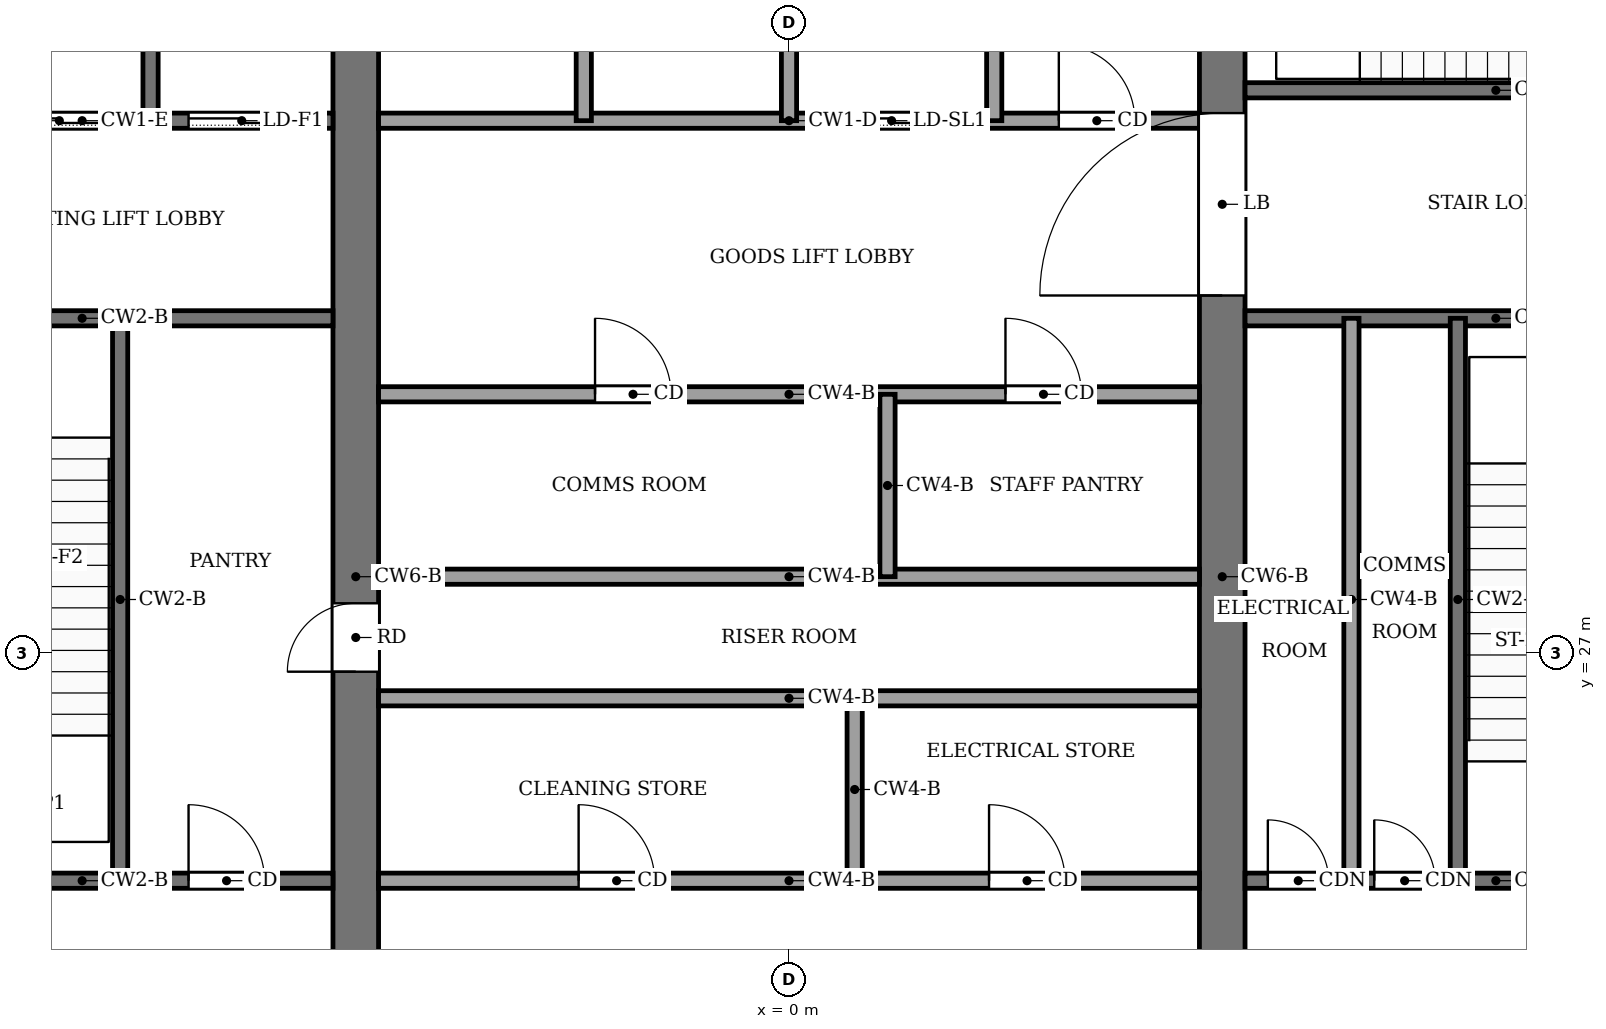
"""IFC4 building model, lengths in metres.
Left out: names, types, materials, properties, quantities, classifications, styles, units other than length and angle.
Written with IfcOpenShell. Run it as: python <this file> out.ifc"""

import sys

from ifc_helpers import new_model, si_unit, direction, frame, frame_2d, origin, place, context, subcontext, project, spatial, rectangle, extrude, element, fill, save


model = new_model("IFC4")
c1 = context("Model", 3, precision=1e-05, world=origin(), true_north=direction((0.0, 1.0)))
c2 = subcontext(c1, "Body", "Model", "MODEL_VIEW")
j1 = project(units=[si_unit("LENGTHUNIT", "METRE"), si_unit("PLANEANGLEUNIT", "RADIAN")], contexts=[c1])
p1 = place(None, origin())
s1 = spatial("IfcSite", under=j1, at=p1, CompositionType="ELEMENT")
p2 = place(p1, origin())
s2 = spatial("IfcBuilding", under=s1, at=p2, CompositionType="ELEMENT")
p3 = place(p2, frame((0.0, 0.0, 289.0)))
s3 = spatial("IfcBuildingStorey", under=s2, at=p3, CompositionType="ELEMENT", Elevation=289.0)
p4 = place(p3, frame((-5.7, 18.4, -0.13), z_axis=(0.0, 0.0, 1.0), x_axis=(0.0, 1.0, 0.0)))
e1 = element("IfcWall", 1, at=p4, inside=s3, PredefinedType="SHEAR", context=c2, shape_type="SweptSolid", body=[
    extrude(rectangle(XDim=19.2, YDim=0.6, at=frame_2d((9.6, 0.0))), origin(), (0.0, 0.0, 1.0), 5.0),
])
p5 = place(p4, frame((8.35, 0.0, 0.13)))
e2 = element("IfcOpeningElement", 2, at=p5, cuts=e1, PredefinedType="OPENING", context=c2, shape_type="SweptSolid", body=[
    extrude(rectangle(XDim=0.9, YDim=2.1, at=frame_2d((0.45, 1.05))), frame((0.0, 0.31, 0.0), z_axis=(0.0, -1.0, 0.0), x_axis=(1.0, 0.0, 0.0)), (0.0, 0.0, 1.0), 0.62),
])
p6 = place(p3, frame((5.7, 18.4, -0.13), z_axis=(0.0, 0.0, 1.0), x_axis=(0.0, 1.0, 0.0)))
e3 = element("IfcWall", 3, at=p6, inside=s3, PredefinedType="SHEAR", context=c2, shape_type="SweptSolid", body=[
    extrude(rectangle(XDim=19.2, YDim=0.6, at=frame_2d((9.6, 0.0))), origin(), (0.0, 0.0, 1.0), 5.0),
])
p7 = place(p6, frame((13.3, 0.0, 0.13)))
e4 = element("IfcOpeningElement", 4, at=p7, cuts=e3, PredefinedType="OPENING", context=c2, shape_type="SweptSolid", body=[
    extrude(rectangle(XDim=2.4, YDim=2.4, at=frame_2d((1.2, 1.2))), frame((0.0, 0.31, 0.0), z_axis=(0.0, -1.0, 0.0), x_axis=(1.0, 0.0, 0.0)), (0.0, 0.0, 1.0), 0.62),
])
p8 = place(p3, frame((-12.6, 24.0, 0.0), z_axis=(0.0, 0.0, 1.0), x_axis=(1.0, 0.0, 0.0)))
e5 = element("IfcWall", 5, at=p8, inside=s3, PredefinedType="PARTITIONING", context=c2, shape_type="SweptSolid", body=[
    extrude(rectangle(XDim=6.6, YDim=0.2, at=frame_2d((3.3, 0.0))), origin(), (0.0, 0.0, 1.0), 4.87),
])
p9 = place(p8, frame((4.7, 0.0, 0.0)))
e6 = element("IfcOpeningElement", 6, at=p9, cuts=e5, PredefinedType="OPENING", context=c2, shape_type="SweptSolid", body=[
    extrude(rectangle(XDim=1.0, YDim=2.1, at=frame_2d((0.5, 1.05))), frame((0.0, 0.11, 0.0), z_axis=(0.0, -1.0, 0.0), x_axis=(1.0, 0.0, 0.0)), (0.0, 0.0, 1.0), 0.22),
])
p10 = place(p3, frame((-5.4, 24.0, 0.0), z_axis=(0.0, 0.0, 1.0), x_axis=(1.0, 0.0, 0.0)))
e7 = element("IfcWall", 7, at=p10, inside=s3, PredefinedType="PARTITIONING", context=c2, shape_type="SweptSolid", body=[
    extrude(rectangle(XDim=10.8, YDim=0.2, at=frame_2d((5.4, 0.0))), origin(), (0.0, 0.0, 1.0), 4.87),
])
p11 = place(p10, frame((2.632, 0.0, 0.0)))
e8 = element("IfcOpeningElement", 8, at=p11, cuts=e7, PredefinedType="OPENING", context=c2, shape_type="SweptSolid", body=[
    extrude(rectangle(XDim=1.0, YDim=2.1, at=frame_2d((0.5, 1.05))), frame((0.0, 0.11, 0.0), z_axis=(0.0, -1.0, 0.0), x_axis=(1.0, 0.0, 0.0)), (0.0, 0.0, 1.0), 0.22),
])
p12 = place(p10, frame((8.032, 0.0, 0.0)))
e9 = element("IfcOpeningElement", 9, at=p12, cuts=e7, PredefinedType="OPENING", context=c2, shape_type="SweptSolid", body=[
    extrude(rectangle(XDim=1.0, YDim=2.1, at=frame_2d((0.5, 1.05))), frame((0.0, 0.11, 0.0), z_axis=(0.0, -1.0, 0.0), x_axis=(1.0, 0.0, 0.0)), (0.0, 0.0, 1.0), 0.22),
])
p13 = place(p3, frame((6.0, 24.0, 0.0), z_axis=(0.0, 0.0, 1.0), x_axis=(1.0, 0.0, 0.0)))
e10 = element("IfcWall", 10, at=p13, inside=s3, PredefinedType="PARTITIONING", context=c2, shape_type="SweptSolid", body=[
    extrude(rectangle(XDim=6.6, YDim=0.2, at=frame_2d((3.3, 0.0))), origin(), (0.0, 0.0, 1.0), 4.87),
])
p14 = place(p13, frame((0.3, 0.0, 0.0)))
e11 = element("IfcOpeningElement", 11, at=p14, cuts=e10, PredefinedType="OPENING", context=c2, shape_type="SweptSolid", body=[
    extrude(rectangle(XDim=0.8, YDim=2.1, at=frame_2d((0.4, 1.05))), frame((0.0, 0.11, 0.0), z_axis=(0.0, -1.0, 0.0), x_axis=(1.0, 0.0, 0.0)), (0.0, 0.0, 1.0), 0.22),
])
p15 = place(p13, frame((1.7, 0.0, 0.0)))
e12 = element("IfcOpeningElement", 12, at=p15, cuts=e10, PredefinedType="OPENING", context=c2, shape_type="SweptSolid", body=[
    extrude(rectangle(XDim=0.8, YDim=2.1, at=frame_2d((0.4, 1.05))), frame((0.0, 0.11, 0.0), z_axis=(0.0, -1.0, 0.0), x_axis=(1.0, 0.0, 0.0)), (0.0, 0.0, 1.0), 0.22),
])
p16 = place(p13, frame((4.4, 0.0, 0.0)))
e13 = element("IfcOpeningElement", 13, at=p16, cuts=e10, PredefinedType="OPENING", context=c2, shape_type="SweptSolid", body=[
    extrude(rectangle(XDim=1.2, YDim=2.2, at=frame_2d((0.6, 1.1))), frame((0.0, 0.11, 0.0), z_axis=(0.0, -1.0, 0.0), x_axis=(1.0, 0.0, 0.0)), (0.0, 0.0, 1.0), 0.22),
])
for number, where, z_axis, x_axis in (
    (14, (-5.4, 26.4, 0.0), (0.0, 0.0, 1.0), (1.0, 0.0, 0.0)),
    (15, (-5.4, 28.0, 0.0), (0.0, 0.0, 1.0), (1.0, 0.0, 0.0)),
):
    element("IfcWall", number, at=place(p3, frame(where, z_axis=z_axis, x_axis=x_axis)), inside=s3, PredefinedType="PARTITIONING", context=c2, shape_type="SweptSolid", body=[
        extrude(rectangle(XDim=10.8, YDim=0.2, at=frame_2d((5.4, 0.0))), origin(), (0.0, 0.0, 1.0), 4.87),
    ])
p17 = place(p3, frame((-5.4, 30.4, 0.0), z_axis=(0.0, 0.0, 1.0), x_axis=(1.0, 0.0, 0.0)))
e16 = element("IfcWall", 16, at=p17, inside=s3, PredefinedType="PARTITIONING", context=c2, shape_type="SweptSolid", body=[
    extrude(rectangle(XDim=10.8, YDim=0.2, at=frame_2d((5.4, 0.0))), origin(), (0.0, 0.0, 1.0), 4.87),
])
p18 = place(p17, frame((2.848, 0.0, 0.0)))
e17 = element("IfcOpeningElement", 17, at=p18, cuts=e16, PredefinedType="OPENING", context=c2, shape_type="SweptSolid", body=[
    extrude(rectangle(XDim=1.0, YDim=2.1, at=frame_2d((0.5, 1.05))), frame((0.0, 0.11, 0.0), z_axis=(0.0, -1.0, 0.0), x_axis=(1.0, 0.0, 0.0)), (0.0, 0.0, 1.0), 0.22),
])
p19 = place(p17, frame((8.248, 0.0, 0.0)))
e18 = element("IfcOpeningElement", 18, at=p19, cuts=e16, PredefinedType="OPENING", context=c2, shape_type="SweptSolid", body=[
    extrude(rectangle(XDim=1.0, YDim=2.1, at=frame_2d((0.5, 1.05))), frame((0.0, 0.11, 0.0), z_axis=(0.0, -1.0, 0.0), x_axis=(1.0, 0.0, 0.0)), (0.0, 0.0, 1.0), 0.22),
])
p20 = place(p3, frame((-12.6, 31.4, 0.0), z_axis=(0.0, 0.0, 1.0), x_axis=(1.0, 0.0, 0.0)))
e19 = element("IfcWall", 19, at=p20, inside=s3, PredefinedType="PARTITIONING", context=c2, shape_type="SweptSolid", body=[
    extrude(rectangle(XDim=6.6, YDim=0.2, at=frame_2d((3.3, 0.0))), origin(), (0.0, 0.0, 1.0), 4.87),
])
p21 = place(p20, frame((1.0, 0.0, 0.0)))
e20 = element("IfcOpeningElement", 20, at=p21, cuts=e19, PredefinedType="OPENING", context=c2, shape_type="SweptSolid", body=[
    extrude(rectangle(XDim=1.2, YDim=2.2, at=frame_2d((0.6, 1.1))), frame((0.0, 0.11, 0.0), z_axis=(0.0, -1.0, 0.0), x_axis=(1.0, 0.0, 0.0)), (0.0, 0.0, 1.0), 0.22),
])
p22 = place(p3, frame((6.0, 31.4, 0.0), z_axis=(0.0, 0.0, 1.0), x_axis=(1.0, 0.0, 0.0)))
e21 = element("IfcWall", 21, at=p22, inside=s3, PredefinedType="PARTITIONING", context=c2, shape_type="SweptSolid", body=[
    extrude(rectangle(XDim=6.6, YDim=0.2, at=frame_2d((3.3, 0.0))), origin(), (0.0, 0.0, 1.0), 4.87),
])
p23 = place(p3, frame((-12.6, 34.0, 0.0), z_axis=(0.0, 0.0, 1.0), x_axis=(1.0, 0.0, 0.0)))
e22 = element("IfcWall", 22, at=p23, inside=s3, PredefinedType="PARTITIONING", context=c2, shape_type="SweptSolid", body=[
    extrude(rectangle(XDim=6.6, YDim=0.2, at=frame_2d((3.3, 0.0))), origin(), (0.0, 0.0, 1.0), 4.87),
])
p24 = place(p23, frame((4.7, 0.0, 0.0)))
e23 = element("IfcOpeningElement", 23, at=p24, cuts=e22, PredefinedType="OPENING", context=c2, shape_type="SweptSolid", body=[
    extrude(rectangle(XDim=1.4, YDim=2.2, at=frame_2d((0.7, 1.1))), frame((0.0, 0.11, 0.0), z_axis=(0.0, -1.0, 0.0), x_axis=(1.0, 0.0, 0.0)), (0.0, 0.0, 1.0), 0.22),
])
p25 = place(p23, frame((2.3, 0.0, 0.0)))
e24 = element("IfcOpeningElement", 24, at=p25, cuts=e22, PredefinedType="OPENING", context=c2, shape_type="SweptSolid", body=[
    extrude(rectangle(XDim=1.4, YDim=2.2, at=frame_2d((0.7, 1.1))), frame((0.0, 0.11, 0.0), z_axis=(0.0, -1.0, 0.0), x_axis=(1.0, 0.0, 0.0)), (0.0, 0.0, 1.0), 0.22),
])
p26 = place(p23, frame((0.45, 0.0, 0.0)))
e25 = element("IfcOpeningElement", 25, at=p26, cuts=e22, PredefinedType="OPENING", context=c2, shape_type="SweptSolid", body=[
    extrude(rectangle(XDim=0.9, YDim=2.1, at=frame_2d((0.45, 1.05))), frame((0.0, 0.11, 0.0), z_axis=(0.0, -1.0, 0.0), x_axis=(1.0, 0.0, 0.0)), (0.0, 0.0, 1.0), 0.22),
])
p27 = place(p3, frame((-5.4, 34.0, 0.0), z_axis=(0.0, 0.0, 1.0), x_axis=(1.0, 0.0, 0.0)))
e26 = element("IfcWall", 26, at=p27, inside=s3, PredefinedType="PARTITIONING", context=c2, shape_type="SweptSolid", body=[
    extrude(rectangle(XDim=10.8, YDim=0.2, at=frame_2d((5.4, 0.0))), origin(), (0.0, 0.0, 1.0), 4.87),
])
p28 = place(p27, frame((6.15, 0.0, 0.0)))
e27 = element("IfcOpeningElement", 27, at=p28, cuts=e26, PredefinedType="OPENING", context=c2, shape_type="SweptSolid", body=[
    extrude(rectangle(XDim=1.2, YDim=2.2, at=frame_2d((0.6, 1.1))), frame((0.0, 0.11, 0.0), z_axis=(0.0, -1.0, 0.0), x_axis=(1.0, 0.0, 0.0)), (0.0, 0.0, 1.0), 0.22),
])
p29 = place(p27, frame((8.95, 0.0, 0.0)))
e28 = element("IfcOpeningElement", 28, at=p29, cuts=e26, PredefinedType="OPENING", context=c2, shape_type="SweptSolid", body=[
    extrude(rectangle(XDim=1.0, YDim=2.1, at=frame_2d((0.5, 1.05))), frame((0.0, 0.11, 0.0), z_axis=(0.0, -1.0, 0.0), x_axis=(1.0, 0.0, 0.0)), (0.0, 0.0, 1.0), 0.22),
])
p30 = place(p3, frame((6.0, 34.4, 0.0), z_axis=(0.0, 0.0, 1.0), x_axis=(1.0, 0.0, 0.0)))
e29 = element("IfcWall", 29, at=p30, inside=s3, PredefinedType="PARTITIONING", context=c2, shape_type="SweptSolid", body=[
    extrude(rectangle(XDim=6.6, YDim=0.2, at=frame_2d((3.3, 0.0))), origin(), (0.0, 0.0, 1.0), 4.87),
])
p31 = place(p30, frame((4.8, 0.0, 0.0)))
e30 = element("IfcOpeningElement", 30, at=p31, cuts=e29, PredefinedType="OPENING", context=c2, shape_type="SweptSolid", body=[
    extrude(rectangle(XDim=1.2, YDim=2.2, at=frame_2d((0.6, 1.1))), frame((0.0, 0.11, 0.0), z_axis=(0.0, -1.0, 0.0), x_axis=(1.0, 0.0, 0.0)), (0.0, 0.0, 1.0), 0.22),
])
p32 = place(p3, frame((-8.8, 24.0, 0.0), z_axis=(0.0, 0.0, 1.0), x_axis=(0.0, 1.0, 0.0)))
e31 = element("IfcWall", 31, at=p32, inside=s3, PredefinedType="PARTITIONING", context=c2, shape_type="SweptSolid", body=[
    extrude(rectangle(XDim=7.4, YDim=0.2, at=frame_2d((3.7, 0.0))), origin(), (0.0, 0.0, 1.0), 4.87),
])
for number, where, z_axis, x_axis in (
    (32, (-8.4, 34.0, 0.0), (0.0, 0.0, 1.0), (0.0, 1.0, 0.0)),
    (33, (-2.7, 34.0, 0.0), (0.0, 0.0, 1.0), (0.0, 1.0, 0.0)),
    (34, (0.0, 34.0, 0.0), (0.0, 0.0, 1.0), (0.0, 1.0, 0.0)),
):
    element("IfcWall", number, at=place(p3, frame(where, z_axis=z_axis, x_axis=x_axis)), inside=s3, PredefinedType="PARTITIONING", context=c2, shape_type="SweptSolid", body=[
        extrude(rectangle(XDim=3.6, YDim=0.2, at=frame_2d((1.8, 0.0))), origin(), (0.0, 0.0, 1.0), 4.87),
    ])
for number, where, z_axis, x_axis in (
    (35, (0.864, 24.0, 0.0), (0.0, 0.0, 1.0), (0.0, 1.0, 0.0)),
    (36, (1.296, 28.0, 0.0), (0.0, 0.0, 1.0), (0.0, 1.0, 0.0)),
):
    element("IfcWall", number, at=place(p3, frame(where, z_axis=z_axis, x_axis=x_axis)), inside=s3, PredefinedType="PARTITIONING", context=c2, shape_type="SweptSolid", body=[
        extrude(rectangle(XDim=2.4, YDim=0.2, at=frame_2d((1.2, 0.0))), origin(), (0.0, 0.0, 1.0), 4.87),
    ])
p33 = place(p3, frame((2.7, 34.0, 0.0), z_axis=(0.0, 0.0, 1.0), x_axis=(0.0, 1.0, 0.0)))
e37 = element("IfcWall", 37, at=p33, inside=s3, PredefinedType="PARTITIONING", context=c2, shape_type="SweptSolid", body=[
    extrude(rectangle(XDim=3.6, YDim=0.2, at=frame_2d((1.8, 0.0))), origin(), (0.0, 0.0, 1.0), 4.87),
])
for number, where, z_axis, x_axis in (
    (38, (7.4, 24.0, 0.0), (0.0, 0.0, 1.0), (0.0, 1.0, 0.0)),
    (39, (8.8, 24.0, 0.0), (0.0, 0.0, 1.0), (0.0, 1.0, 0.0)),
):
    element("IfcWall", number, at=place(p3, frame(where, z_axis=z_axis, x_axis=x_axis)), inside=s3, PredefinedType="PARTITIONING", context=c2, shape_type="SweptSolid", body=[
        extrude(rectangle(XDim=7.4, YDim=0.2, at=frame_2d((3.7, 0.0))), origin(), (0.0, 0.0, 1.0), 4.87),
    ])
p34 = place(p28, origin())
e40 = element("IfcDoor", 40, at=p34, inside=s3, OperationType="SLIDING_TO_LEFT", PredefinedType="DOOR", context=c2, shape_type="SweptSolid", body=[
    extrude(rectangle(XDim=1.2, YDim=2.2, at=frame_2d((0.6, 1.1))), frame((0.0, 0.025, 0.0), z_axis=(0.0, -1.0, 0.0), x_axis=(1.0, 0.0, 0.0)), (0.0, 0.0, 1.0), 0.05),
])
fill(e27, e40)
p35 = place(p24, origin())
e41 = element("IfcDoor", 41, at=p35, inside=s3, OperationType="SLIDING_TO_LEFT", PredefinedType="DOOR", context=c2, shape_type="SweptSolid", body=[
    extrude(rectangle(XDim=1.4, YDim=2.2, at=frame_2d((0.7, 1.1))), frame((0.0, 0.025, 0.0), z_axis=(0.0, -1.0, 0.0), x_axis=(1.0, 0.0, 0.0)), (0.0, 0.0, 1.0), 0.05),
])
fill(e23, e41)
p36 = place(p25, origin())
e42 = element("IfcDoor", 42, at=p36, inside=s3, OperationType="SLIDING_TO_LEFT", PredefinedType="DOOR", context=c2, shape_type="SweptSolid", body=[
    extrude(rectangle(XDim=1.4, YDim=2.2, at=frame_2d((0.7, 1.1))), frame((0.0, 0.025, 0.0), z_axis=(0.0, -1.0, 0.0), x_axis=(1.0, 0.0, 0.0)), (0.0, 0.0, 1.0), 0.05),
])
fill(e24, e42)
p37 = place(p11, origin())
e43 = element("IfcDoor", 43, at=p37, inside=s3, OperationType="SINGLE_SWING_LEFT", PredefinedType="DOOR", context=c2, shape_type="SweptSolid", body=[
    extrude(rectangle(XDim=1.0, YDim=2.1, at=frame_2d((0.5, 1.05))), frame((0.0, 0.025, 0.0), z_axis=(0.0, -1.0, 0.0), x_axis=(1.0, 0.0, 0.0)), (0.0, 0.0, 1.0), 0.05),
])
fill(e8, e43)
p38 = place(p12, origin())
e44 = element("IfcDoor", 44, at=p38, inside=s3, OperationType="SINGLE_SWING_RIGHT", PredefinedType="DOOR", context=c2, shape_type="SweptSolid", body=[
    extrude(rectangle(XDim=1.0, YDim=2.1, at=frame_2d((0.5, 1.05))), frame((0.0, 0.025, 0.0), z_axis=(0.0, -1.0, 0.0), x_axis=(1.0, 0.0, 0.0)), (0.0, 0.0, 1.0), 0.05),
])
fill(e9, e44)
p39 = place(p18, origin())
e45 = element("IfcDoor", 45, at=p39, inside=s3, OperationType="SINGLE_SWING_LEFT", PredefinedType="DOOR", context=c2, shape_type="SweptSolid", body=[
    extrude(rectangle(XDim=1.0, YDim=2.1, at=frame_2d((0.5, 1.05))), frame((0.0, 0.025, 0.0), z_axis=(0.0, -1.0, 0.0), x_axis=(1.0, 0.0, 0.0)), (0.0, 0.0, 1.0), 0.05),
])
fill(e17, e45)
p40 = place(p19, origin())
e46 = element("IfcDoor", 46, at=p40, inside=s3, OperationType="SINGLE_SWING_RIGHT", PredefinedType="DOOR", context=c2, shape_type="SweptSolid", body=[
    extrude(rectangle(XDim=1.0, YDim=2.1, at=frame_2d((0.5, 1.05))), frame((0.0, 0.025, 0.0), z_axis=(0.0, -1.0, 0.0), x_axis=(1.0, 0.0, 0.0)), (0.0, 0.0, 1.0), 0.05),
])
fill(e18, e46)
p41 = place(p9, origin())
e47 = element("IfcDoor", 47, at=p41, inside=s3, OperationType="SINGLE_SWING_RIGHT", PredefinedType="DOOR", context=c2, shape_type="SweptSolid", body=[
    extrude(rectangle(XDim=1.0, YDim=2.1, at=frame_2d((0.5, 1.05))), frame((0.0, 0.025, 0.0), z_axis=(0.0, -1.0, 0.0), x_axis=(1.0, 0.0, 0.0)), (0.0, 0.0, 1.0), 0.05),
])
fill(e6, e47)
p42 = place(p14, origin())
e48 = element("IfcDoor", 48, at=p42, inside=s3, OperationType="SINGLE_SWING_RIGHT", PredefinedType="DOOR", context=c2, shape_type="SweptSolid", body=[
    extrude(rectangle(XDim=0.8, YDim=2.1, at=frame_2d((0.4, 1.05))), frame((0.0, 0.025, 0.0), z_axis=(0.0, -1.0, 0.0), x_axis=(1.0, 0.0, 0.0)), (0.0, 0.0, 1.0), 0.05),
])
fill(e11, e48)
p43 = place(p15, origin())
e49 = element("IfcDoor", 49, at=p43, inside=s3, OperationType="SINGLE_SWING_LEFT", PredefinedType="DOOR", context=c2, shape_type="SweptSolid", body=[
    extrude(rectangle(XDim=0.8, YDim=2.1, at=frame_2d((0.4, 1.05))), frame((0.0, 0.025, 0.0), z_axis=(0.0, -1.0, 0.0), x_axis=(1.0, 0.0, 0.0)), (0.0, 0.0, 1.0), 0.05),
])
fill(e12, e49)
p44 = place(p29, origin())
e50 = element("IfcDoor", 50, at=p44, inside=s3, OperationType="SINGLE_SWING_LEFT", PredefinedType="DOOR", context=c2, shape_type="SweptSolid", body=[
    extrude(rectangle(XDim=1.0, YDim=2.1, at=frame_2d((0.5, 1.05))), frame((0.0, 0.025, 0.0), z_axis=(0.0, -1.0, 0.0), x_axis=(1.0, 0.0, 0.0)), (0.0, 0.0, 1.0), 0.05),
])
fill(e28, e50)
p45 = place(p5, origin())
e51 = element("IfcDoor", 51, at=p45, inside=s3, OperationType="SINGLE_SWING_LEFT", PredefinedType="DOOR", context=c2, shape_type="SweptSolid", body=[
    extrude(rectangle(XDim=0.9, YDim=2.1, at=frame_2d((0.45, 1.05))), frame((0.0, 0.025, 0.0), z_axis=(0.0, -1.0, 0.0), x_axis=(1.0, 0.0, 0.0)), (0.0, 0.0, 1.0), 0.05),
])
fill(e2, e51)
p46 = place(p7, origin())
e52 = element("IfcDoor", 52, at=p46, inside=s3, OperationType="DOUBLE_DOOR_SINGLE_SWING", PredefinedType="DOOR", context=c2, shape_type="SweptSolid", body=[
    extrude(rectangle(XDim=2.4, YDim=2.4, at=frame_2d((1.2, 1.2))), frame((0.0, 0.025, 0.0), z_axis=(0.0, -1.0, 0.0), x_axis=(1.0, 0.0, 0.0)), (0.0, 0.0, 1.0), 0.05),
])
fill(e4, e52)
save(model, sys.argv[1])
